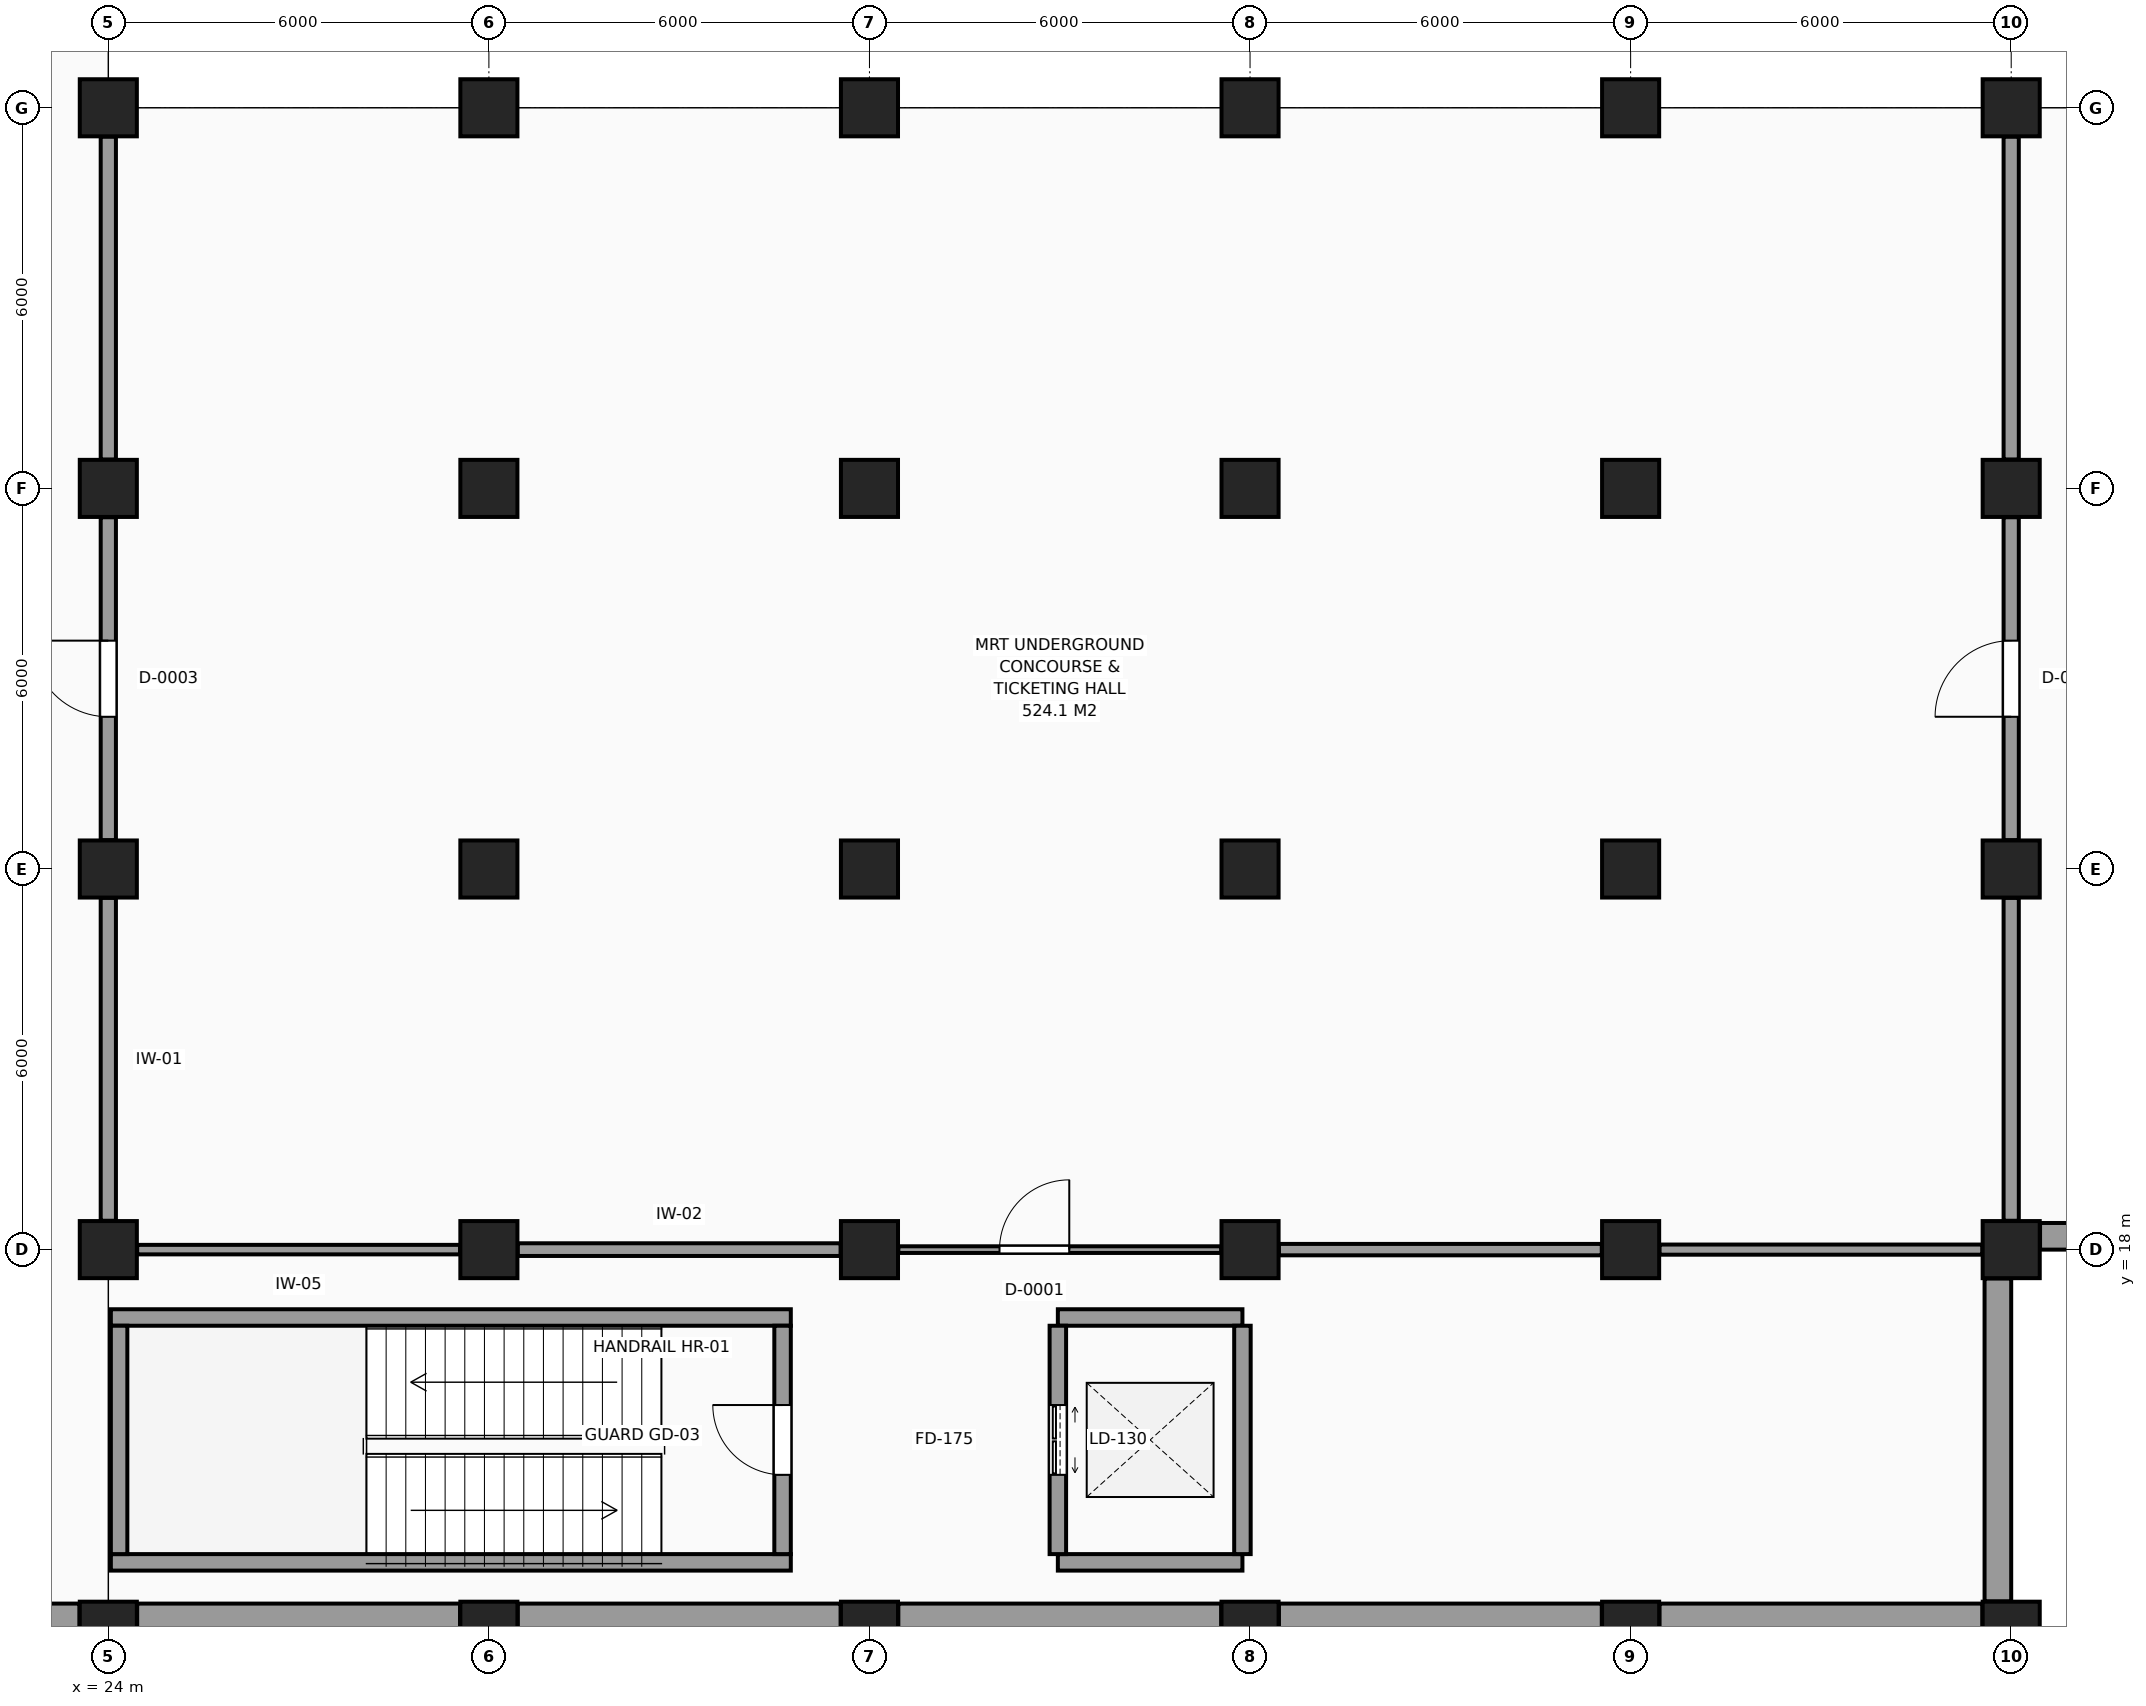
"""IFC4 building model, lengths in metres.
Left out: names, types, materials, properties, quantities, classifications, styles, units other than length and angle.
Written with IfcOpenShell. Run it as: python <this file> out.ifc"""

import sys

from ifc_helpers import new_model, si_unit, direction, frame, frame_2d, origin, origin_2d, place, context, subcontext, project, spatial, rectangle, extrude, element, fill, save


model = new_model("IFC4")
c1 = context("Model", 3, precision=1e-05, world=origin(), true_north=direction((0.0, 1.0)))
c2 = subcontext(c1, "Body", "Model", "MODEL_VIEW")
j1 = project(units=[si_unit("LENGTHUNIT", "METRE"), si_unit("PLANEANGLEUNIT", "RADIAN")], contexts=[c1])
p1 = place(None, origin())
s1 = spatial("IfcSite", under=j1, at=p1, CompositionType="ELEMENT")
p2 = place(p1, origin())
s2 = spatial("IfcBuilding", under=s1, at=p2, CompositionType="ELEMENT")
p3 = place(p2, frame((0.0, 0.0, -4.8)))
s3 = spatial("IfcBuildingStorey", under=s2, at=p3, CompositionType="ELEMENT", Elevation=-4.8)
for number, where, z_axis, x_axis in (
    (1, (24.0, 12.0, 0.0), (0.0, 0.0, 1.0), (1.0, 0.0, 0.0)),
    (2, (24.0, 18.0, 0.0), (0.0, 0.0, 1.0), (1.0, 0.0, 0.0)),
    (3, (24.0, 24.0, 0.0), (0.0, 0.0, 1.0), (1.0, 0.0, 0.0)),
    (4, (24.0, 30.0, 0.0), (0.0, 0.0, 1.0), (1.0, 0.0, 0.0)),
    (5, (24.0, 36.0, 0.0), (0.0, 0.0, 1.0), (1.0, 0.0, 0.0)),
    (6, (30.0, 12.0, 0.0), (0.0, 0.0, 1.0), (1.0, 0.0, 0.0)),
    (7, (30.0, 18.0, 0.0), (0.0, 0.0, 1.0), (1.0, 0.0, 0.0)),
    (8, (30.0, 24.0, 0.0), (0.0, 0.0, 1.0), (1.0, 0.0, 0.0)),
    (9, (30.0, 30.0, 0.0), (0.0, 0.0, 1.0), (1.0, 0.0, 0.0)),
    (10, (30.0, 36.0, 0.0), (0.0, 0.0, 1.0), (1.0, 0.0, 0.0)),
    (11, (36.0, 12.0, 0.0), (0.0, 0.0, 1.0), (1.0, 0.0, 0.0)),
    (12, (36.0, 18.0, 0.0), (0.0, 0.0, 1.0), (1.0, 0.0, 0.0)),
    (13, (36.0, 24.0, 0.0), (0.0, 0.0, 1.0), (1.0, 0.0, 0.0)),
    (14, (36.0, 30.0, 0.0), (0.0, 0.0, 1.0), (1.0, 0.0, 0.0)),
    (15, (36.0, 36.0, 0.0), (0.0, 0.0, 1.0), (1.0, 0.0, 0.0)),
    (16, (42.0, 12.0, 0.0), (0.0, 0.0, 1.0), (1.0, 0.0, 0.0)),
    (17, (42.0, 18.0, 0.0), (0.0, 0.0, 1.0), (1.0, 0.0, 0.0)),
    (18, (42.0, 24.0, 0.0), (0.0, 0.0, 1.0), (1.0, 0.0, 0.0)),
    (19, (42.0, 30.0, 0.0), (0.0, 0.0, 1.0), (1.0, 0.0, 0.0)),
    (20, (42.0, 36.0, 0.0), (0.0, 0.0, 1.0), (1.0, 0.0, 0.0)),
    (21, (48.0, 12.0, 0.0), (0.0, 0.0, 1.0), (1.0, 0.0, 0.0)),
    (22, (48.0, 18.0, 0.0), (0.0, 0.0, 1.0), (1.0, 0.0, 0.0)),
    (23, (48.0, 24.0, 0.0), (0.0, 0.0, 1.0), (1.0, 0.0, 0.0)),
    (24, (48.0, 30.0, 0.0), (0.0, 0.0, 1.0), (1.0, 0.0, 0.0)),
    (25, (48.0, 36.0, 0.0), (0.0, 0.0, 1.0), (1.0, 0.0, 0.0)),
    (26, (54.0, 12.0, 0.0), (0.0, 0.0, 1.0), (1.0, 0.0, 0.0)),
    (27, (54.0, 18.0, 0.0), (0.0, 0.0, 1.0), (1.0, 0.0, 0.0)),
    (28, (54.0, 24.0, 0.0), (0.0, 0.0, 1.0), (1.0, 0.0, 0.0)),
    (29, (54.0, 30.0, 0.0), (0.0, 0.0, 1.0), (1.0, 0.0, 0.0)),
    (30, (54.0, 36.0, 0.0), (0.0, 0.0, 1.0), (1.0, 0.0, 0.0)),
):
    element("IfcColumn", number, at=place(p3, frame(where, z_axis=z_axis, x_axis=x_axis)), inside=s3, PredefinedType="COLUMN", context=c2, shape_type="SweptSolid", body=[
        extrude(rectangle(XDim=0.9, YDim=0.9, at=origin_2d()), origin(), (0.0, 0.0, 1.0), 4.8),
    ])
p4 = place(p3, frame((18.455, 12.21, 0.0), z_axis=(0.0, 0.0, 1.0), x_axis=(1.0, 0.0, 0.0)))
e31 = element("IfcWall", 31, at=p4, inside=s3, PredefinedType="SOLIDWALL", context=c2, shape_type="SweptSolid", body=[
    extrude(rectangle(XDim=5.09, YDim=0.42, at=frame_2d((2.545, 0.0))), origin(), (0.0, 0.0, 1.0), 3.8),
])
for number, where, z_axis, x_axis in (
    (32, (24.455, 12.21, 0.0), (0.0, 0.0, 1.0), (1.0, 0.0, 0.0)),
    (33, (30.455, 12.21, 0.0), (0.0, 0.0, 1.0), (1.0, 0.0, 0.0)),
    (34, (36.455, 12.21, 0.0), (0.0, 0.0, 1.0), (1.0, 0.0, 0.0)),
    (35, (42.455, 12.21, 0.0), (0.0, 0.0, 1.0), (1.0, 0.0, 0.0)),
    (36, (48.455, 12.21, 0.0), (0.0, 0.0, 1.0), (1.0, 0.0, 0.0)),
    (37, (53.79, 12.455, 0.0), (0.0, 0.0, 1.0), (0.0, 1.0, 0.0)),
    (38, (54.455, 18.21, 0.0), (0.0, 0.0, 1.0), (1.0, 0.0, 0.0)),
):
    element("IfcWall", number, at=place(p3, frame(where, z_axis=z_axis, x_axis=x_axis)), inside=s3, PredefinedType="SOLIDWALL", context=c2, shape_type="SweptSolid", body=[
        extrude(rectangle(XDim=5.09, YDim=0.42, at=frame_2d((2.545, 0.0))), origin(), (0.0, 0.0, 1.0), 3.75),
    ])
for number, where, z_axis, x_axis in (
    (39, (24.04, 13.07, -0.5), (0.0, 0.0, 1.0), (1.0, 0.0, 0.0)),
    (40, (24.04, 16.93, -0.5), (0.0, 0.0, 1.0), (1.0, 0.0, 0.0)),
):
    element("IfcWall", number, at=place(p3, frame(where, z_axis=z_axis, x_axis=x_axis)), inside=s3, PredefinedType="SHEAR", context=c2, shape_type="SweptSolid", body=[
        extrude(rectangle(XDim=10.72, YDim=0.26, at=frame_2d((5.36, 0.0))), origin(), (0.0, 0.0, 1.0), 5.3),
    ])
p5 = place(p3, frame((24.17, 13.2, -0.5), z_axis=(0.0, 0.0, 1.0), x_axis=(0.0, 1.0, 0.0)))
e41 = element("IfcWall", 41, at=p5, inside=s3, PredefinedType="SHEAR", context=c2, shape_type="SweptSolid", body=[
    extrude(rectangle(XDim=3.6, YDim=0.26, at=frame_2d((1.8, 0.0))), origin(), (0.0, 0.0, 1.0), 5.3),
])
p6 = place(p3, frame((34.63, 13.2, -0.5), z_axis=(0.0, 0.0, 1.0), x_axis=(0.0, 1.0, 0.0)))
e42 = element("IfcWall", 42, at=p6, inside=s3, PredefinedType="SHEAR", context=c2, shape_type="SweptSolid", body=[
    extrude(rectangle(XDim=3.6, YDim=0.26, at=frame_2d((1.8, 0.0))), origin(), (0.0, 0.0, 1.0), 5.3),
])
p7 = place(p6, frame((1.25, 0.0, 0.5)))
e43 = element("IfcOpeningElement", 43, at=p7, cuts=e42, PredefinedType="OPENING", context=c2, shape_type="SweptSolid", body=[
    extrude(rectangle(XDim=1.1, YDim=2.15, at=frame_2d((0.55, 1.075))), frame((0.0, 0.14, 0.0), z_axis=(0.0, -1.0, 0.0), x_axis=(1.0, 0.0, 0.0)), (0.0, 0.0, 1.0), 0.28),
])
for number, where, z_axis, x_axis in (
    (44, (38.97, 13.07, -0.5), (0.0, 0.0, 1.0), (1.0, 0.0, 0.0)),
    (45, (38.97, 16.93, -0.5), (0.0, 0.0, 1.0), (1.0, 0.0, 0.0)),
):
    element("IfcWall", number, at=place(p3, frame(where, z_axis=z_axis, x_axis=x_axis)), inside=s3, PredefinedType="SHEAR", context=c2, shape_type="SweptSolid", body=[
        extrude(rectangle(XDim=2.91, YDim=0.26, at=frame_2d((1.455, 0.0))), origin(), (0.0, 0.0, 1.0), 5.3),
    ])
p8 = place(p3, frame((41.88, 13.2, -0.5), z_axis=(0.0, 0.0, 1.0), x_axis=(0.0, 1.0, 0.0)))
e46 = element("IfcWall", 46, at=p8, inside=s3, PredefinedType="SHEAR", context=c2, shape_type="SweptSolid", body=[
    extrude(rectangle(XDim=3.6, YDim=0.26, at=frame_2d((1.8, 0.0))), origin(), (0.0, 0.0, 1.0), 5.3),
])
p9 = place(p3, frame((38.97, 13.2, -0.5), z_axis=(0.0, 0.0, 1.0), x_axis=(0.0, 1.0, 0.0)))
e47 = element("IfcWall", 47, at=p9, inside=s3, PredefinedType="SHEAR", context=c2, shape_type="SweptSolid", body=[
    extrude(rectangle(XDim=3.6, YDim=0.26, at=frame_2d((1.8, 0.0))), origin(), (0.0, 0.0, 1.0), 5.3),
])
p10 = place(p9, frame((1.25, 0.0, 0.5)))
e48 = element("IfcOpeningElement", 48, at=p10, cuts=e47, PredefinedType="OPENING", context=c2, shape_type="SweptSolid", body=[
    extrude(rectangle(XDim=1.1, YDim=2.2, at=frame_2d((0.55, 1.1))), frame((0.0, 0.14, 0.0), z_axis=(0.0, -1.0, 0.0), x_axis=(1.0, 0.0, 0.0)), (0.0, 0.0, 1.0), 0.28),
])
p11 = place(p3, frame((24.0, 18.455, 0.0), z_axis=(0.0, 0.0, 1.0), x_axis=(0.0, 1.0, 0.0)))
e49 = element("IfcWall", 49, at=p11, inside=s3, PredefinedType="PARTITIONING", context=c2, shape_type="SweptSolid", body=[
    extrude(rectangle(XDim=5.09, YDim=0.24, at=frame_2d((2.545, 0.0))), origin(), (0.0, 0.0, 1.0), 3.7),
])
p12 = place(p3, frame((24.0, 24.455, 0.0), z_axis=(0.0, 0.0, 1.0), x_axis=(0.0, 1.0, 0.0)))
e50 = element("IfcWall", 50, at=p12, inside=s3, PredefinedType="PARTITIONING", context=c2, shape_type="SweptSolid", body=[
    extrude(rectangle(XDim=5.09, YDim=0.24, at=frame_2d((2.545, 0.0))), origin(), (0.0, 0.0, 1.0), 3.7),
])
p13 = place(p12, frame((1.945, 0.0, 0.0)))
e51 = element("IfcOpeningElement", 51, at=p13, cuts=e50, PredefinedType="OPENING", context=c2, shape_type="SweptSolid", body=[
    extrude(rectangle(XDim=1.2, YDim=2.2, at=frame_2d((0.6, 1.1))), frame((0.0, 0.13, 0.0), z_axis=(0.0, -1.0, 0.0), x_axis=(1.0, 0.0, 0.0)), (0.0, 0.0, 1.0), 0.26),
])
p14 = place(p3, frame((24.0, 30.455, 0.0), z_axis=(0.0, 0.0, 1.0), x_axis=(0.0, 1.0, 0.0)))
e52 = element("IfcWall", 52, at=p14, inside=s3, PredefinedType="PARTITIONING", context=c2, shape_type="SweptSolid", body=[
    extrude(rectangle(XDim=5.09, YDim=0.24, at=frame_2d((2.545, 0.0))), origin(), (0.0, 0.0, 1.0), 3.7),
])
p15 = place(p3, frame((54.0, 18.455, 0.0), z_axis=(0.0, 0.0, 1.0), x_axis=(0.0, 1.0, 0.0)))
e53 = element("IfcWall", 53, at=p15, inside=s3, PredefinedType="PARTITIONING", context=c2, shape_type="SweptSolid", body=[
    extrude(rectangle(XDim=5.09, YDim=0.24, at=frame_2d((2.545, 0.0))), origin(), (0.0, 0.0, 1.0), 4.0),
])
p16 = place(p3, frame((54.0, 24.455, 0.0), z_axis=(0.0, 0.0, 1.0), x_axis=(0.0, 1.0, 0.0)))
e54 = element("IfcWall", 54, at=p16, inside=s3, PredefinedType="PARTITIONING", context=c2, shape_type="SweptSolid", body=[
    extrude(rectangle(XDim=5.09, YDim=0.24, at=frame_2d((2.545, 0.0))), origin(), (0.0, 0.0, 1.0), 4.16),
])
p17 = place(p16, frame((1.945, 0.0, 0.0)))
e55 = element("IfcOpeningElement", 55, at=p17, cuts=e54, PredefinedType="OPENING", context=c2, shape_type="SweptSolid", body=[
    extrude(rectangle(XDim=1.2, YDim=2.2, at=frame_2d((0.6, 1.1))), frame((0.0, 0.13, 0.0), z_axis=(0.0, -1.0, 0.0), x_axis=(1.0, 0.0, 0.0)), (0.0, 0.0, 1.0), 0.26),
])
p18 = place(p3, frame((54.0, 30.455, 0.0), z_axis=(0.0, 0.0, 1.0), x_axis=(0.0, 1.0, 0.0)))
e56 = element("IfcWall", 56, at=p18, inside=s3, PredefinedType="PARTITIONING", context=c2, shape_type="SweptSolid", body=[
    extrude(rectangle(XDim=5.09, YDim=0.24, at=frame_2d((2.545, 0.0))), origin(), (0.0, 0.0, 1.0), 3.7),
])
p19 = place(p3, frame((24.455, 18.0, 0.0), z_axis=(0.0, 0.0, 1.0), x_axis=(1.0, 0.0, 0.0)))
e57 = element("IfcWall", 57, at=p19, inside=s3, PredefinedType="PARTITIONING", context=c2, shape_type="SweptSolid", body=[
    extrude(rectangle(XDim=5.09, YDim=0.15, at=frame_2d((2.545, 0.0))), origin(), (0.0, 0.0, 1.0), 4.21),
])
p20 = place(p3, frame((30.455, 18.0, 0.0), z_axis=(0.0, 0.0, 1.0), x_axis=(1.0, 0.0, 0.0)))
e58 = element("IfcWall", 58, at=p20, inside=s3, PredefinedType="PARTITIONING", context=c2, shape_type="SweptSolid", body=[
    extrude(rectangle(XDim=5.09, YDim=0.2, at=frame_2d((2.545, 0.0))), origin(), (0.0, 0.0, 1.0), 3.7),
])
p21 = place(p3, frame((36.455, 18.0, 0.0), z_axis=(0.0, 0.0, 1.0), x_axis=(1.0, 0.0, 0.0)))
e59 = element("IfcWall", 59, at=p21, inside=s3, PredefinedType="PARTITIONING", context=c2, shape_type="SweptSolid", body=[
    extrude(rectangle(XDim=5.09, YDim=0.105, at=frame_2d((2.545, 0.0))), origin(), (0.0, 0.0, 1.0), 3.8),
])
p22 = place(p21, frame((1.595, 0.0, 0.0)))
e60 = element("IfcOpeningElement", 60, at=p22, cuts=e59, PredefinedType="OPENING", context=c2, shape_type="SweptSolid", body=[
    extrude(rectangle(XDim=1.1, YDim=2.15, at=frame_2d((0.55, 1.075))), frame((0.0, 0.062, 0.0), z_axis=(0.0, -1.0, 0.0), x_axis=(1.0, 0.0, 0.0)), (0.0, 0.0, 1.0), 0.125),
])
p23 = place(p3, frame((42.455, 18.0, 0.0), z_axis=(0.0, 0.0, 1.0), x_axis=(1.0, 0.0, 0.0)))
e61 = element("IfcWall", 61, at=p23, inside=s3, PredefinedType="PARTITIONING", context=c2, shape_type="SweptSolid", body=[
    extrude(rectangle(XDim=5.09, YDim=0.18, at=frame_2d((2.545, 0.0))), origin(), (0.0, 0.0, 1.0), 3.9),
])
p24 = place(p3, frame((48.455, 18.0, 0.0), z_axis=(0.0, 0.0, 1.0), x_axis=(1.0, 0.0, 0.0)))
e62 = element("IfcWall", 62, at=p24, inside=s3, PredefinedType="PARTITIONING", context=c2, shape_type="SweptSolid", body=[
    extrude(rectangle(XDim=5.09, YDim=0.16, at=frame_2d((2.545, 0.0))), origin(), (0.0, 0.0, 1.0), 4.05),
])
p25 = place(p7, origin())
e63 = element("IfcDoor", 63, at=p25, inside=s3, OperationType="SINGLE_SWING_RIGHT", PredefinedType="DOOR", context=c2, shape_type="SweptSolid", body=[
    extrude(rectangle(XDim=1.1, YDim=2.15, at=frame_2d((0.55, 1.075))), frame((0.0, 0.025, 0.0), z_axis=(0.0, -1.0, 0.0), x_axis=(1.0, 0.0, 0.0)), (0.0, 0.0, 1.0), 0.05),
])
fill(e43, e63)
p26 = place(p10, origin())
e64 = element("IfcDoor", 64, at=p26, inside=s3, OperationType="DOUBLE_DOOR_SLIDING", PredefinedType="DOOR", context=c2, shape_type="SweptSolid", body=[
    extrude(rectangle(XDim=1.1, YDim=2.2, at=frame_2d((0.55, 1.1))), frame((0.0, 0.025, 0.0), z_axis=(0.0, -1.0, 0.0), x_axis=(1.0, 0.0, 0.0)), (0.0, 0.0, 1.0), 0.05),
])
fill(e48, e64)
p27 = place(p22, origin())
e65 = element("IfcDoor", 65, at=p27, inside=s3, OperationType="SINGLE_SWING_RIGHT", PredefinedType="DOOR", context=c2, shape_type="SweptSolid", body=[
    extrude(rectangle(XDim=1.1, YDim=2.15, at=frame_2d((0.55, 1.075))), frame((0.0, 0.025, 0.0), z_axis=(0.0, -1.0, 0.0), x_axis=(1.0, 0.0, 0.0)), (0.0, 0.0, 1.0), 0.05),
])
fill(e60, e65)
p28 = place(p17, origin())
e66 = element("IfcDoor", 66, at=p28, inside=s3, OperationType="SINGLE_SWING_LEFT", PredefinedType="DOOR", context=c2, shape_type="SweptSolid", body=[
    extrude(rectangle(XDim=1.2, YDim=2.2, at=frame_2d((0.6, 1.1))), frame((0.0, 0.025, 0.0), z_axis=(0.0, -1.0, 0.0), x_axis=(1.0, 0.0, 0.0)), (0.0, 0.0, 1.0), 0.05),
])
fill(e55, e66)
p29 = place(p13, origin())
e67 = element("IfcDoor", 67, at=p29, inside=s3, OperationType="SINGLE_SWING_RIGHT", PredefinedType="DOOR", context=c2, shape_type="SweptSolid", body=[
    extrude(rectangle(XDim=1.2, YDim=2.2, at=frame_2d((0.6, 1.1))), frame((0.0, 0.025, 0.0), z_axis=(0.0, -1.0, 0.0), x_axis=(1.0, 0.0, 0.0)), (0.0, 0.0, 1.0), 0.05),
])
fill(e51, e67)
save(model, sys.argv[1])
